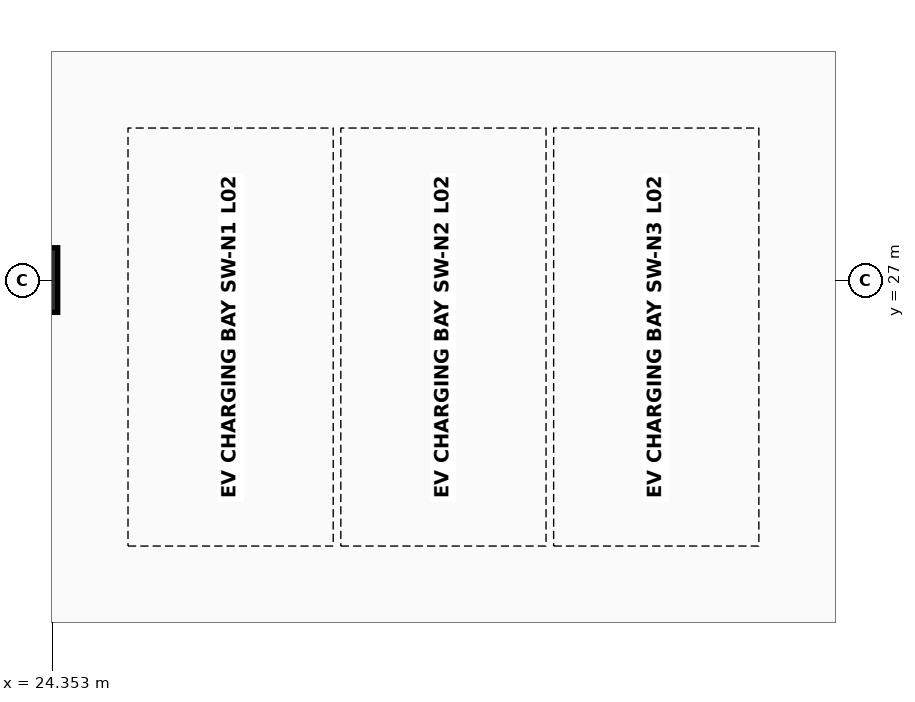
"""IFC4 building model, lengths in metres.
Left out: names, types, materials, properties, quantities, classifications, styles, units other than length and angle.
Written with IfcOpenShell. Run it as: python <this file> out.ifc"""

import sys

from ifc_helpers import new_model, si_unit, direction, frame, origin, origin_2d, place, context, subcontext, project, spatial, rectangle, extrude, element, save


model = new_model("IFC4")
c1 = context("Model", 3, precision=1e-05, world=origin(), true_north=direction((0.0, 1.0)))
c2 = subcontext(c1, "Body", "Model", "MODEL_VIEW")
j1 = project(units=[si_unit("LENGTHUNIT", "METRE"), si_unit("PLANEANGLEUNIT", "RADIAN")], contexts=[c1])
p1 = place(None, origin())
s1 = spatial("IfcSite", under=j1, at=p1, CompositionType="ELEMENT")
p2 = place(p1, origin())
s2 = spatial("IfcBuilding", under=s1, at=p2, CompositionType="ELEMENT")
p3 = place(p2, frame((0.0, 0.0, 9.6)))
s3 = spatial("IfcBuildingStorey", under=s2, at=p3, CompositionType="ELEMENT", Elevation=9.6)
p4 = place(p3, frame((24.0, 27.0, 0.0), z_axis=(0.0, 0.0, 1.0), x_axis=(1.0, 0.0, 0.0)))
e1 = element("IfcColumn", 1, at=p4, inside=s3, PredefinedType="COLUMN", context=c2, shape_type="SweptSolid", body=[
    extrude(rectangle(XDim=0.85, YDim=0.85, at=origin_2d()), origin(), (0.0, 0.0, 1.0), 3.8),
])
save(model, sys.argv[1])
